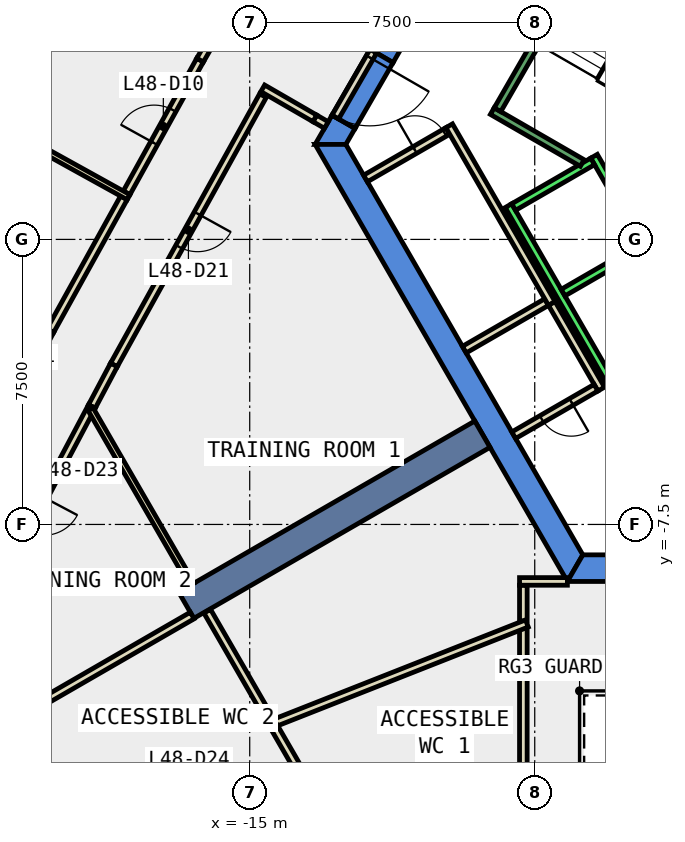
"""IFC4 building model, lengths in metres.
Left out: names, types, materials, properties, quantities, classifications, styles, units other than length and angle.
Written with IfcOpenShell. Run it as: python <this file> out.ifc"""

import sys

from ifc_helpers import new_model, si_unit, direction, frame, frame_2d, origin, place, context, subcontext, project, spatial, polyline, rectangle, outline, extrude, element, fill, save


model = new_model("IFC4")
c1 = context("Model", 3, precision=1e-05, world=origin(), true_north=direction((0.0, 1.0)))
c2 = subcontext(c1, "Body", "Model", "MODEL_VIEW")
j1 = project(units=[si_unit("LENGTHUNIT", "METRE"), si_unit("PLANEANGLEUNIT", "RADIAN")], contexts=[c1])
p1 = place(None, origin())
s1 = spatial("IfcSite", under=j1, at=p1, CompositionType="ELEMENT")
p2 = place(p1, origin())
s2 = spatial("IfcBuilding", under=s1, at=p2, CompositionType="ELEMENT")
p3 = place(p2, frame((0.0, 0.0, 215.0)))
s3 = spatial("IfcBuildingStorey", under=s2, at=p3, CompositionType="ELEMENT", Elevation=215.0)
p4 = place(p3, frame((0.0, 0.0, -0.4)))
e1 = element("IfcWall", 1, at=p4, inside=s3, PredefinedType="SHEAR", context=c2, shape_type="SweptSolid", body=[
    extrude(outline(polyline([(-11.834, 5.002), (-11.228, 4.652), (-6.235, 13.3), (-6.64, 14.0), (-11.834, 5.002)])), origin(), (0.0, 0.0, 1.0), 4.2),
])
p5 = place(p3, frame((0.0, 0.0, -0.4)))
e2 = element("IfcWall", 2, at=p5, inside=s3, PredefinedType="SHEAR", context=c2, shape_type="SweptSolid", body=[
    extrude(outline(polyline([(-12.228, 2.92), (-12.834, 3.27), (-13.279, 2.5), (-12.471, 2.5), (-12.228, 2.92)])), origin(), (0.0, 0.0, 1.0), 4.2),
])
p6 = place(p3, frame((0.0, 0.0, 3.6)))
e3 = element("IfcWall", 3, at=p6, inside=s3, PredefinedType="SHEAR", context=c2, shape_type="SweptSolid", body=[
    extrude(outline(polyline([(-12.834, 3.27), (-12.228, 2.92), (-11.228, 4.652), (-11.834, 5.002), (-12.834, 3.27)])), origin(), (0.0, 0.0, 1.0), 0.2),
])
p7 = place(p3, frame((0.0, 0.0, -0.4)))
e4 = element("IfcWall", 4, at=p7, inside=s3, PredefinedType="SHEAR", context=c2, shape_type="SweptSolid", body=[
    extrude(outline(polyline([(-13.279, 2.5), (-6.64, -9.0), (-6.235, -8.3), (-12.471, 2.5), (-13.279, 2.5)])), origin(), (0.0, 0.0, 1.0), 4.2),
])
p8 = place(p3, frame((0.0, 0.0, -0.4)))
e5 = element("IfcWall", 5, at=p8, inside=s3, PredefinedType="SHEAR", context=c2, shape_type="SweptSolid", body=[
    extrude(outline(polyline([(3.75, -9.0), (3.75, -8.3), (-6.235, -8.3), (-6.64, -9.0), (3.75, -9.0)])), origin(), (0.0, 0.0, 1.0), 4.2),
])
p9 = place(p3, frame((-8.877, -5.125, -0.4), z_axis=(0.0, 0.0, 1.0), x_axis=(-0.866017533419, -0.500013631625, 0.0)))
e6 = element("IfcWall", 6, at=p9, inside=s3, PredefinedType="SHEAR", context=c2, shape_type="SweptSolid", body=[
    extrude(rectangle(XDim=9.0, YDim=0.8, at=frame_2d((4.5, 0.0))), origin(), (0.0, 0.0, 1.0), 4.2),
])
p10 = place(p3, frame((-12.984, 3.01, 0.0), z_axis=(0.0, 0.0, 1.0), x_axis=(-0.866046247233, 0.49996389635, 0.0)))
e7 = element("IfcWall", 7, at=p10, inside=s3, PredefinedType="PARTITIONING", context=c2, shape_type="SweptSolid", body=[
    extrude(rectangle(XDim=0.35, YDim=0.2, at=frame_2d((0.175, 0.0))), origin(), (0.0, 0.0, 1.0), 2.4),
])
p11 = place(p3, frame((-14.652, 3.783, 0.0), z_axis=(0.0, 0.0, 1.0), x_axis=(-0.484249955458, -0.874929700398, 0.0)))
e8 = element("IfcWall", 8, at=p11, inside=s3, PredefinedType="PARTITIONING", context=c2, shape_type="SweptSolid", body=[
    extrude(rectangle(XDim=8.099, YDim=0.2, at=frame_2d((4.049, 0.0))), origin(), (0.0, 0.0, 1.0), 3.8),
])
p12 = place(p11, frame((3.55, 0.0, 0.0)))
e9 = element("IfcOpeningElement", 9, at=p12, cuts=e8, PredefinedType="OPENING", context=c2, shape_type="SweptSolid", body=[
    extrude(rectangle(XDim=1.0, YDim=2.1, at=frame_2d((0.5, 1.05))), frame((0.0, 0.11, 0.0), z_axis=(0.0, -1.0, 0.0), x_axis=(1.0, 0.0, 0.0)), (0.0, 0.0, 1.0), 0.22),
])
p13 = place(p3, frame((-18.574, -3.303, 0.0), z_axis=(0.0, 0.0, 1.0), x_axis=(-0.468458328651, -0.883485593724, 0.0)))
e10 = element("IfcWall", 10, at=p13, inside=s3, PredefinedType="PARTITIONING", context=c2, shape_type="SweptSolid", body=[
    extrude(rectangle(XDim=1.238, YDim=0.2, at=frame_2d((0.619, 0.0))), origin(), (0.0, 0.0, 1.0), 3.8),
])
p14 = place(p3, frame((-19.154, -4.397, 0.0), z_axis=(0.0, 0.0, 1.0), x_axis=(-0.468118749105, -0.883665568378, 0.0)))
e11 = element("IfcWall", 11, at=p14, inside=s3, PredefinedType="PARTITIONING", context=c2, shape_type="SweptSolid", body=[
    extrude(rectangle(XDim=6.409, YDim=0.2, at=frame_2d((3.204, 0.0))), origin(), (0.0, 0.0, 1.0), 3.8),
])
p15 = place(p14, frame((2.704, 0.0, 0.0)))
e12 = element("IfcOpeningElement", 12, at=p15, cuts=e11, PredefinedType="OPENING", context=c2, shape_type="SweptSolid", body=[
    extrude(rectangle(XDim=1.0, YDim=2.1, at=frame_2d((0.5, 1.05))), frame((0.0, 0.11, 0.0), z_axis=(0.0, -1.0, 0.0), x_axis=(1.0, 0.0, 0.0)), (0.0, 0.0, 1.0), 0.22),
])
p16 = place(p3, frame((-18.24, 1.225, 0.0), z_axis=(0.0, 0.0, 1.0), x_axis=(0.484411997038, 0.874839995156, 0.0)))
e13 = element("IfcWall", 13, at=p16, inside=s3, PredefinedType="PARTITIONING", context=c2, shape_type="SweptSolid", body=[
    extrude(rectangle(XDim=3.993, YDim=0.2, at=frame_2d((1.996, 0.0))), origin(), (0.0, 0.0, 1.0), 3.8),
])
p17 = place(p16, frame((1.496, 0.0, 0.0)))
e14 = element("IfcOpeningElement", 14, at=p17, cuts=e13, PredefinedType="OPENING", context=c2, shape_type="SweptSolid", body=[
    extrude(rectangle(XDim=1.0, YDim=2.1, at=frame_2d((0.5, 1.05))), frame((0.0, 0.11, 0.0), z_axis=(0.0, -1.0, 0.0), x_axis=(1.0, 0.0, 0.0)), (0.0, 0.0, 1.0), 0.22),
])
p18 = place(p3, frame((-16.306, 4.718, 0.0), z_axis=(0.0, 0.0, 1.0), x_axis=(0.499803646539, 0.866138738832, 0.0)))
e15 = element("IfcWall", 15, at=p18, inside=s3, PredefinedType="PARTITIONING", context=c2, shape_type="SweptSolid", body=[
    extrude(rectangle(XDim=3.991, YDim=0.2, at=frame_2d((1.996, 0.0))), origin(), (0.0, 0.0, 1.0), 3.8),
])
p19 = place(p3, frame((-22.14, -5.976, 0.0), z_axis=(0.0, 0.0, 1.0), x_axis=(0.467979143965, 0.883739509592, 0.0)))
e16 = element("IfcWall", 16, at=p19, inside=s3, PredefinedType="PARTITIONING", context=c2, shape_type="SweptSolid", body=[
    extrude(rectangle(XDim=4.049, YDim=0.2, at=frame_2d((2.024, 0.0))), origin(), (0.0, 0.0, 1.0), 3.8),
])
p20 = place(p19, frame((1.524, 0.0, 0.0)))
e17 = element("IfcOpeningElement", 17, at=p20, cuts=e16, PredefinedType="OPENING", context=c2, shape_type="SweptSolid", body=[
    extrude(rectangle(XDim=1.0, YDim=2.1, at=frame_2d((0.5, 1.05))), frame((0.0, 0.11, 0.0), z_axis=(0.0, -1.0, 0.0), x_axis=(1.0, 0.0, 0.0)), (0.0, 0.0, 1.0), 0.22),
])
p21 = place(p3, frame((-20.245, -2.398, 0.0), z_axis=(0.0, 0.0, 1.0), x_axis=(0.484328424129, 0.874886265511, 0.0)))
e18 = element("IfcWall", 18, at=p21, inside=s3, PredefinedType="PARTITIONING", context=c2, shape_type="SweptSolid", body=[
    extrude(rectangle(XDim=3.991, YDim=0.2, at=frame_2d((1.996, 0.0))), origin(), (0.0, 0.0, 1.0), 3.8),
])
p22 = place(p3, frame((-7.188, -1.65, 0.0), z_axis=(0.0, 0.0, 1.0), x_axis=(-0.866022959057, -0.500004234368, 0.0)))
e19 = element("IfcWall", 19, at=p22, inside=s3, PredefinedType="PARTITIONING", context=c2, shape_type="SweptSolid", body=[
    extrude(rectangle(XDim=2.5, YDim=0.2, at=frame_2d((1.25, 0.0))), origin(), (0.0, 0.0, 1.0), 3.8),
])
p23 = place(p3, frame((-11.953, 1.603, 0.0), z_axis=(0.0, 0.0, 1.0), x_axis=(0.865998541277, 0.500046524342, 0.0)))
e20 = element("IfcWall", 20, at=p23, inside=s3, PredefinedType="PARTITIONING", context=c2, shape_type="SweptSolid", body=[
    extrude(rectangle(XDim=2.5, YDim=0.2, at=frame_2d((1.25, 0.0))), origin(), (0.0, 0.0, 1.0), 3.8),
])
p24 = place(p23, frame((1.5, 0.0, 0.0)))
e21 = element("IfcOpeningElement", 21, at=p24, cuts=e20, PredefinedType="OPENING", context=c2, shape_type="SweptSolid", body=[
    extrude(rectangle(XDim=0.9, YDim=2.1, at=frame_2d((0.45, 1.05))), frame((0.0, 0.11, 0.0), z_axis=(0.0, -1.0, 0.0), x_axis=(1.0, 0.0, 0.0)), (0.0, 0.0, 1.0), 0.22),
])
p25 = place(p3, frame((-9.751, 2.99, 0.0), z_axis=(0.0, 0.0, 1.0), x_axis=(0.499955951776, -0.866050833545, 0.0)))
e22 = element("IfcWall", 22, at=p25, inside=s3, PredefinedType="PARTITIONING", context=c2, shape_type="SweptSolid", body=[
    extrude(rectangle(XDim=5.4, YDim=0.2, at=frame_2d((2.7, 0.0))), origin(), (0.0, 0.0, 1.0), 3.8),
])
p26 = place(p3, frame((-7.051, -1.687, 0.0), z_axis=(0.0, 0.0, 1.0), x_axis=(0.500128937424, -0.865950948929, 0.0)))
e23 = element("IfcWall", 23, at=p26, inside=s3, PredefinedType="PARTITIONING", context=c2, shape_type="SweptSolid", body=[
    extrude(rectangle(XDim=2.599, YDim=0.2, at=frame_2d((1.3, 0.0))), origin(), (0.0, 0.0, 1.0), 3.8),
])
p27 = place(p3, frame((-5.888, -3.902, 0.0), z_axis=(0.0, 0.0, 1.0), x_axis=(-0.866022959057, -0.500004234368, 0.0)))
e24 = element("IfcWall", 24, at=p27, inside=s3, PredefinedType="PARTITIONING", context=c2, shape_type="SweptSolid", body=[
    extrude(rectangle(XDim=2.5, YDim=0.2, at=frame_2d((1.25, 0.0))), origin(), (0.0, 0.0, 1.0), 3.8),
])
p28 = place(p27, frame((0.75, 0.0, 0.0)))
e25 = element("IfcOpeningElement", 25, at=p28, cuts=e24, PredefinedType="OPENING", context=c2, shape_type="SweptSolid", body=[
    extrude(rectangle(XDim=0.9, YDim=2.1, at=frame_2d((0.45, 1.05))), frame((0.0, 0.11, 0.0), z_axis=(0.0, -1.0, 0.0), x_axis=(1.0, 0.0, 0.0)), (0.0, 0.0, 1.0), 0.22),
])
p29 = place(p3, frame((-7.8, -10.041, 0.0), z_axis=(0.0, 0.0, 1.0), x_axis=(0.0, 1.0, 0.0)))
e26 = element("IfcWall", 26, at=p29, inside=s3, PredefinedType="PARTITIONING", context=c2, shape_type="SweptSolid", body=[
    extrude(rectangle(XDim=0.942, YDim=0.2, at=frame_2d((0.471, 0.0))), origin(), (0.0, 0.0, 1.0), 3.8),
])
p30 = place(p3, frame((-7.9, -8.999, 0.0), z_axis=(0.0, 0.0, 1.0), x_axis=(1.0, 0.0, 0.0)))
e27 = element("IfcWall", 27, at=p30, inside=s3, PredefinedType="PARTITIONING", context=c2, shape_type="SweptSolid", body=[
    extrude(rectangle(XDim=1.259, YDim=0.2, at=frame_2d((0.629, 0.0))), origin(), (0.0, 0.0, 1.0), 3.8),
])
p31 = place(p3, frame((-7.8, -14.959, 0.0), z_axis=(0.0, 0.0, 1.0), x_axis=(0.0, 1.0, 0.0)))
e28 = element("IfcWall", 28, at=p31, inside=s3, PredefinedType="PARTITIONING", context=c2, shape_type="SweptSolid", body=[
    extrude(rectangle(XDim=4.718, YDim=0.2, at=frame_2d((2.359, 0.0))), origin(), (0.0, 0.0, 1.0), 3.8),
])
p32 = place(p3, frame((-7.707, -10.105, 0.0), z_axis=(0.0, 0.0, 1.0), x_axis=(-0.930316800812, -0.36675693603, 0.0)))
e29 = element("IfcWall", 29, at=p32, inside=s3, PredefinedType="PARTITIONING", context=c2, shape_type="SweptSolid", body=[
    extrude(rectangle(XDim=7.302, YDim=0.2, at=frame_2d((3.651, 0.0))), origin(), (0.0, 0.0, 1.0), 3.8),
])
p33 = place(p3, frame((-16.525, -9.079, 0.0), z_axis=(0.0, 0.0, 1.0), x_axis=(-0.499943228252, 0.866058178487, 0.0)))
e30 = element("IfcWall", 30, at=p33, inside=s3, PredefinedType="PARTITIONING", context=c2, shape_type="SweptSolid", body=[
    extrude(rectangle(XDim=5.329, YDim=0.15, at=frame_2d((2.664, 0.0))), origin(), (0.0, 0.0, 1.0), 3.8),
])
p34 = place(p3, frame((-14.457, -12.66, 0.0), z_axis=(0.0, 0.0, 1.0), x_axis=(-0.49997268395, 0.866041174139, 0.0)))
e31 = element("IfcWall", 31, at=p34, inside=s3, PredefinedType="PARTITIONING", context=c2, shape_type="SweptSolid", body=[
    extrude(rectangle(XDim=3.322, YDim=0.2, at=frame_2d((1.661, 0.0))), origin(), (0.0, 0.0, 1.0), 3.8),
])
p35 = place(p3, frame((-13.146, -14.93, 0.0), z_axis=(0.0, 0.0, 1.0), x_axis=(-0.500086091327, 0.865975693228, 0.0)))
e32 = element("IfcWall", 32, at=p35, inside=s3, PredefinedType="PARTITIONING", context=c2, shape_type="SweptSolid", body=[
    extrude(rectangle(XDim=2.421, YDim=0.2, at=frame_2d((1.211, 0.0))), origin(), (0.0, 0.0, 1.0), 3.8),
])
p36 = place(p3, frame((-16.514, -9.897, 0.0), z_axis=(0.0, 0.0, 1.0), x_axis=(-0.866041209536, -0.499972622635, 0.0)))
e33 = element("IfcWall", 33, at=p36, inside=s3, PredefinedType="PARTITIONING", context=c2, shape_type="SweptSolid", body=[
    extrude(rectangle(XDim=6.843, YDim=0.2, at=frame_2d((3.421, 0.0))), origin(), (0.0, 0.0, 1.0), 3.8),
])
p37 = place(p3, frame((-18.189, 1.111, 0.0), z_axis=(0.0, 0.0, 1.0), x_axis=(-0.874928335558, 0.484252421405, 0.0)))
e34 = element("IfcWall", 34, at=p37, inside=s3, PredefinedType="PARTITIONING", context=c2, shape_type="SweptSolid", body=[
    extrude(rectangle(XDim=6.1, YDim=0.15, at=frame_2d((3.05, 0.0))), origin(), (0.0, 0.0, 1.0), 3.8),
])
p38 = place(p3, frame((-11.747, 4.952, 0.0), z_axis=(0.0, 0.0, 1.0), x_axis=(-0.50002537861, -0.866010750942, 0.0)))
e35 = element("IfcWall", 35, at=p38, inside=s3, PredefinedType="PARTITIONING", context=c2, shape_type="SweptSolid", body=[
    extrude(rectangle(XDim=2.0, YDim=0.2, at=frame_2d((1.0, 0.0))), origin(), (0.0, 0.0, 1.0), 2.4),
])
p39 = place(p38, frame((0.19, 0.0, 0.0)))
e36 = element("IfcOpeningElement", 36, at=p39, cuts=e35, PredefinedType="OPENING", context=c2, shape_type="SweptSolid", body=[
    extrude(rectangle(XDim=1.8, YDim=2.1, at=frame_2d((0.9, 1.05))), frame((0.0, 0.11, 0.0), z_axis=(0.0, -1.0, 0.0), x_axis=(1.0, 0.0, 0.0)), (0.0, 0.0, 1.0), 0.22),
])
p40 = place(p3, frame((-13.287, 3.185, 0.0), z_axis=(0.0, 0.0, 1.0), x_axis=(-0.865992812752, 0.500056445075, 0.0)))
e37 = element("IfcWall", 37, at=p40, inside=s3, PredefinedType="PARTITIONING", context=c2, shape_type="SweptSolid", body=[
    extrude(rectangle(XDim=1.582, YDim=0.2, at=frame_2d((0.791, 0.0))), origin(), (0.0, 0.0, 1.0), 3.8),
])
p41 = place(p3, frame((-5.94, 2.188, 0.0), z_axis=(0.0, 0.0, 1.0), x_axis=(0.500034260056, -0.866005622828, 0.0)))
e38 = element("IfcWall", 38, at=p41, inside=s3, PredefinedType="STANDARD", context=c2, shape_type="SweptSolid", body=[
    extrude(rectangle(XDim=5.399, YDim=0.2, at=frame_2d((2.7, 0.0))), origin(), (0.0, 0.0, 1.0), 3.8),
])
p42 = place(p41, frame((3.075, 0.0, 0.0)))
e39 = element("IfcOpeningElement", 39, at=p42, cuts=e38, PredefinedType="OPENING", context=c2, shape_type="SweptSolid", body=[
    extrude(rectangle(XDim=1.1, YDim=2.1, at=frame_2d((0.55, 1.05))), frame((0.0, 0.11, 0.0), z_axis=(0.0, -1.0, 0.0), x_axis=(1.0, 0.0, 0.0)), (0.0, 0.0, 1.0), 0.22),
])
p43 = place(p41, frame((1.225, 0.0, 0.0)))
e40 = element("IfcOpeningElement", 40, at=p43, cuts=e38, PredefinedType="OPENING", context=c2, shape_type="SweptSolid", body=[
    extrude(rectangle(XDim=1.1, YDim=2.1, at=frame_2d((0.55, 1.05))), frame((0.0, 0.11, 0.0), z_axis=(0.0, -1.0, 0.0), x_axis=(1.0, 0.0, 0.0)), (0.0, 0.0, 1.0), 0.22),
])
p44 = place(p3, frame((-8.192, 0.888, 0.0), z_axis=(0.0, 0.0, 1.0), x_axis=(0.500034260056, -0.866005622828, 0.0)))
e41 = element("IfcWall", 41, at=p44, inside=s3, PredefinedType="STANDARD", context=c2, shape_type="SweptSolid", body=[
    extrude(rectangle(XDim=5.399, YDim=0.2, at=frame_2d((2.7, 0.0))), origin(), (0.0, 0.0, 1.0), 3.8),
])
for number, where, z_axis, x_axis in (
    (42, (-5.977, 2.052, 0.0), (0.0, 0.0, 1.0), (-0.866, -0.5, 0.0)),
    (43, (-4.677, -0.2, 0.0), (0.0, 0.0, 1.0), (-0.866, -0.5, 0.0)),
):
    element("IfcWall", number, at=place(p3, frame(where, z_axis=z_axis, x_axis=x_axis)), inside=s3, PredefinedType="STANDARD", context=c2, shape_type="SweptSolid", body=[
        extrude(rectangle(XDim=2.399, YDim=0.2, at=frame_2d((1.2, 0.0))), origin(), (0.0, 0.0, 1.0), 3.8),
    ])
p45 = place(p3, frame((-6.25, 2.01, 0.0), z_axis=(0.0, 0.0, 1.0), x_axis=(-0.86611865017, 0.499838457731, 0.0)))
e44 = element("IfcWall", 44, at=p45, inside=s3, PredefinedType="STANDARD", context=c2, shape_type="SweptSolid", body=[
    extrude(rectangle(XDim=2.733, YDim=0.2, at=frame_2d((1.366, 0.0))), origin(), (0.0, 0.0, 1.0), 3.8),
])
p46 = place(p3, frame((-5.03, 9.388, 0.0), z_axis=(0.0, 0.0, 1.0), x_axis=(-0.499978703459, -0.866037698999, 0.0)))
e45 = element("IfcWall", 45, at=p46, inside=s3, PredefinedType="STANDARD", context=c2, shape_type="SweptSolid", body=[
    extrude(rectangle(XDim=6.9, YDim=0.2, at=frame_2d((3.45, 0.0))), origin(), (0.0, 0.0, 1.0), 3.8),
])
p47 = place(p17, origin())
e46 = element("IfcDoor", 46, at=p47, inside=s3, OperationType="SINGLE_SWING_LEFT", PredefinedType="DOOR", context=c2, shape_type="SweptSolid", body=[
    extrude(rectangle(XDim=1.0, YDim=2.1, at=frame_2d((0.5, 1.05))), frame((0.0, 0.025, 0.0), z_axis=(0.0, -1.0, 0.0), x_axis=(1.0, 0.0, 0.0)), (0.0, 0.0, 1.0), 0.05),
])
fill(e14, e46)
p48 = place(p12, origin())
e47 = element("IfcDoor", 47, at=p48, inside=s3, OperationType="SINGLE_SWING_LEFT", PredefinedType="DOOR", context=c2, shape_type="SweptSolid", body=[
    extrude(rectangle(XDim=1.0, YDim=2.1, at=frame_2d((0.5, 1.05))), frame((0.0, 0.025, 0.0), z_axis=(0.0, -1.0, 0.0), x_axis=(1.0, 0.0, 0.0)), (0.0, 0.0, 1.0), 0.05),
])
fill(e9, e47)
p49 = place(p24, origin())
e48 = element("IfcDoor", 48, at=p49, inside=s3, OperationType="SINGLE_SWING_LEFT", PredefinedType="DOOR", context=c2, shape_type="SweptSolid", body=[
    extrude(rectangle(XDim=0.9, YDim=2.1, at=frame_2d((0.45, 1.05))), frame((0.0, 0.025, 0.0), z_axis=(0.0, -1.0, 0.0), x_axis=(1.0, 0.0, 0.0)), (0.0, 0.0, 1.0), 0.05),
])
fill(e21, e48)
p50 = place(p28, origin())
e49 = element("IfcDoor", 49, at=p50, inside=s3, OperationType="SINGLE_SWING_RIGHT", PredefinedType="DOOR", context=c2, shape_type="SweptSolid", body=[
    extrude(rectangle(XDim=0.9, YDim=2.1, at=frame_2d((0.45, 1.05))), frame((0.0, 0.025, 0.0), z_axis=(0.0, -1.0, 0.0), x_axis=(1.0, 0.0, 0.0)), (0.0, 0.0, 1.0), 0.05),
])
fill(e25, e49)
p51 = place(p39, origin())
e50 = element("IfcDoor", 50, at=p51, inside=s3, OperationType="DOUBLE_DOOR_SINGLE_SWING", PredefinedType="DOOR", context=c2, shape_type="SweptSolid", body=[
    extrude(rectangle(XDim=1.8, YDim=2.1, at=frame_2d((0.9, 1.05))), frame((0.0, 0.025, 0.0), z_axis=(0.0, -1.0, 0.0), x_axis=(1.0, 0.0, 0.0)), (0.0, 0.0, 1.0), 0.05),
])
fill(e36, e50)
save(model, sys.argv[1])
